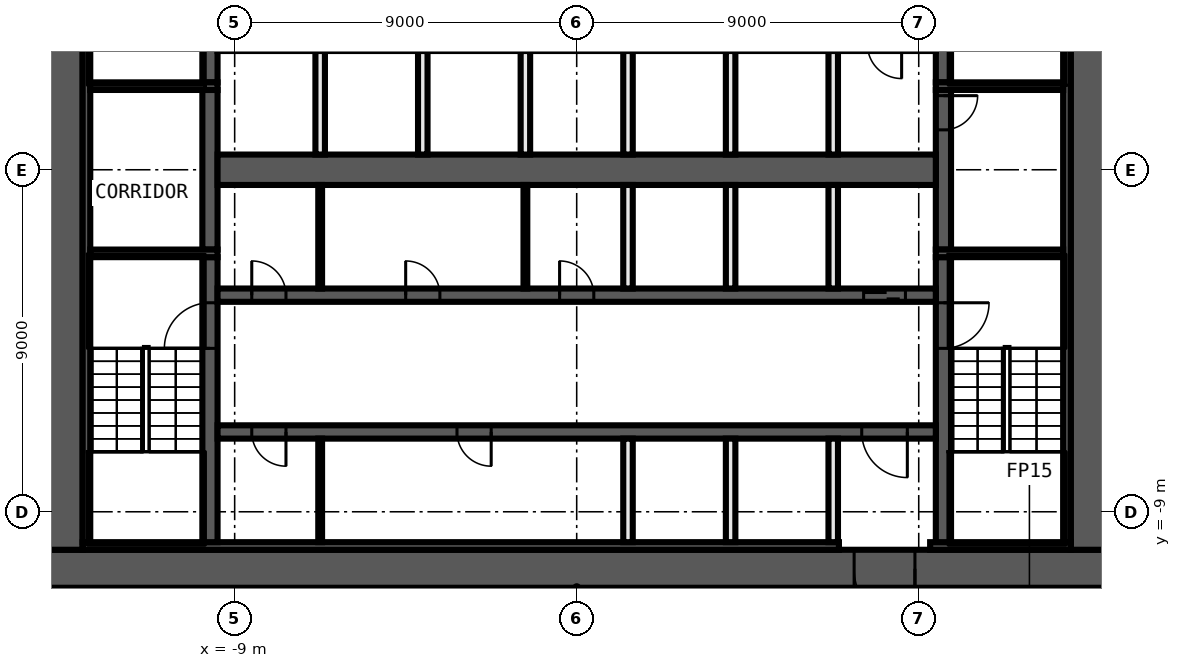
"""IFC4 building model, lengths in metres.
Left out: names, types, materials, properties, quantities, classifications, styles, units other than length and angle.
Written with IfcOpenShell. Run it as: python <this file> out.ifc"""

import sys

from ifc_helpers import new_model, si_unit, direction, frame, frame_2d, origin, place, context, subcontext, project, spatial, rectangle, extrude, element, fill, save


model = new_model("IFC4")
c1 = context("Model", 3, precision=1e-05, world=origin(), true_north=direction((0.0, 1.0)))
c2 = subcontext(c1, "Body", "Model", "MODEL_VIEW")
j1 = project(units=[si_unit("LENGTHUNIT", "METRE"), si_unit("PLANEANGLEUNIT", "RADIAN")], contexts=[c1])
p1 = place(None, origin())
s1 = spatial("IfcSite", under=j1, at=p1, CompositionType="ELEMENT")
p2 = place(p1, origin())
s2 = spatial("IfcBuilding", under=s1, at=p2, CompositionType="ELEMENT")
p3 = place(p2, frame((0.0, 0.0, 139.6)))
s3 = spatial("IfcBuildingStorey", under=s2, at=p3, CompositionType="ELEMENT", Elevation=139.6)
p4 = place(p3, frame((14.0, -10.5, 0.0), z_axis=(0.0, 0.0, 1.0), x_axis=(-1.0, 0.0, 0.0)))
e1 = element("IfcWall", 1, at=p4, inside=s3, PredefinedType="SHEAR", context=c2, shape_type="SweptSolid", body=[
    extrude(rectangle(XDim=28.0, YDim=1.0, at=frame_2d((14.0, 0.0))), origin(), (0.0, 0.0, 1.0), 5.4),
])
p5 = place(p4, frame((5.1, 0.0, 0.0)))
e2 = element("IfcOpeningElement", 2, at=p5, cuts=e1, PredefinedType="OPENING", context=c2, shape_type="SweptSolid", body=[
    extrude(rectangle(XDim=1.6, YDim=2.1, at=frame_2d((0.8, 1.05))), frame((0.0, 0.51, 0.0), z_axis=(0.0, -1.0, 0.0), x_axis=(1.0, 0.0, 0.0)), (0.0, 0.0, 1.0), 1.02),
])
for number, where, z_axis, x_axis in (
    (3, (13.5, 10.0, 0.0), (0.0, 0.0, 1.0), (0.0, -1.0, 0.0)),
    (4, (-13.5, -10.0, 0.0), (0.0, 0.0, 1.0), (0.0, 1.0, 0.0)),
):
    element("IfcWall", number, at=place(p3, frame(where, z_axis=z_axis, x_axis=x_axis)), inside=s3, PredefinedType="SHEAR", context=c2, shape_type="SweptSolid", body=[
        extrude(rectangle(XDim=20.0, YDim=1.0, at=frame_2d((10.0, 0.0))), origin(), (0.0, 0.0, 1.0), 5.4),
    ])
p6 = place(p3, frame((13.0, -9.9, 0.0), z_axis=(0.0, 0.0, 1.0), x_axis=(-1.0, 0.0, 0.0)))
e5 = element("IfcWall", 5, at=p6, inside=s3, PredefinedType="SHEAR", context=c2, shape_type="SweptSolid", body=[
    extrude(rectangle(XDim=3.7, YDim=0.2, at=frame_2d((1.85, 0.0))), origin(), (0.0, 0.0, 1.0), 5.4),
])
p7 = place(p3, frame((6.9, -9.9, 0.0), z_axis=(0.0, 0.0, 1.0), x_axis=(-1.0, 0.0, 0.0)))
e6 = element("IfcWall", 6, at=p7, inside=s3, PredefinedType="SHEAR", context=c2, shape_type="SweptSolid", body=[
    extrude(rectangle(XDim=19.9, YDim=0.2, at=frame_2d((9.95, 0.0))), origin(), (0.0, 0.0, 1.0), 5.4),
])
for number, where, z_axis, x_axis in (
    (7, (12.9, 9.8, 0.0), (0.0, 0.0, 1.0), (0.0, -1.0, 0.0)),
    (8, (-12.9, -9.8, 0.0), (0.0, 0.0, 1.0), (0.0, 1.0, 0.0)),
):
    element("IfcWall", number, at=place(p3, frame(where, z_axis=z_axis, x_axis=x_axis)), inside=s3, PredefinedType="SHEAR", context=c2, shape_type="SweptSolid", body=[
        extrude(rectangle(XDim=19.6, YDim=0.2, at=frame_2d((9.8, 0.0))), origin(), (0.0, 0.0, 1.0), 5.4),
    ])
p8 = place(p3, frame((9.65, -2.3, 0.0), z_axis=(0.0, 0.0, 1.0), x_axis=(0.0, -1.0, 0.0)))
e9 = element("IfcWall", 9, at=p8, inside=s3, PredefinedType="SHEAR", context=c2, shape_type="SweptSolid", body=[
    extrude(rectangle(XDim=7.5, YDim=0.4, at=frame_2d((3.75, 0.0))), origin(), (0.0, 0.0, 1.0), 5.4),
])
p9 = place(p8, frame((1.2, 0.0, 0.0)))
e10 = element("IfcOpeningElement", 10, at=p9, cuts=e9, PredefinedType="OPENING", context=c2, shape_type="SweptSolid", body=[
    extrude(rectangle(XDim=1.2, YDim=2.1, at=frame_2d((0.6, 1.05))), frame((0.0, 0.21, 0.0), z_axis=(0.0, -1.0, 0.0), x_axis=(1.0, 0.0, 0.0)), (0.0, 0.0, 1.0), 0.42),
])
p10 = place(p3, frame((9.65, 2.1, 0.0), z_axis=(0.0, 0.0, 1.0), x_axis=(0.0, -1.0, 0.0)))
e11 = element("IfcWall", 11, at=p10, inside=s3, PredefinedType="SHEAR", context=c2, shape_type="SweptSolid", body=[
    extrude(rectangle(XDim=4.2, YDim=0.4, at=frame_2d((2.1, 0.0))), origin(), (0.0, 0.0, 1.0), 5.4),
])
p11 = place(p10, frame((0.15, 0.0, 0.0)))
e12 = element("IfcOpeningElement", 12, at=p11, cuts=e11, PredefinedType="OPENING", context=c2, shape_type="SweptSolid", body=[
    extrude(rectangle(XDim=0.9, YDim=2.1, at=frame_2d((0.45, 1.05))), frame((0.0, 0.21, 0.0), z_axis=(0.0, -1.0, 0.0), x_axis=(1.0, 0.0, 0.0)), (0.0, 0.0, 1.0), 0.42),
])
p12 = place(p3, frame((9.65, 9.8, 0.0), z_axis=(0.0, 0.0, 1.0), x_axis=(0.0, -1.0, 0.0)))
e13 = element("IfcWall", 13, at=p12, inside=s3, PredefinedType="SHEAR", context=c2, shape_type="SweptSolid", body=[
    extrude(rectangle(XDim=7.5, YDim=0.4, at=frame_2d((3.75, 0.0))), origin(), (0.0, 0.0, 1.0), 5.4),
])
p13 = place(p12, frame((5.1, 0.0, 0.0)))
e14 = element("IfcOpeningElement", 14, at=p13, cuts=e13, PredefinedType="OPENING", context=c2, shape_type="SweptSolid", body=[
    extrude(rectangle(XDim=1.2, YDim=2.1, at=frame_2d((0.6, 1.05))), frame((0.0, 0.21, 0.0), z_axis=(0.0, -1.0, 0.0), x_axis=(1.0, 0.0, 0.0)), (0.0, 0.0, 1.0), 0.42),
])
p14 = place(p3, frame((-9.65, -9.8, 0.0), z_axis=(0.0, 0.0, 1.0), x_axis=(0.0, 1.0, 0.0)))
e15 = element("IfcWall", 15, at=p14, inside=s3, PredefinedType="SHEAR", context=c2, shape_type="SweptSolid", body=[
    extrude(rectangle(XDim=7.5, YDim=0.4, at=frame_2d((3.75, 0.0))), origin(), (0.0, 0.0, 1.0), 5.4),
])
p15 = place(p14, frame((5.1, 0.0, 0.0)))
e16 = element("IfcOpeningElement", 16, at=p15, cuts=e15, PredefinedType="OPENING", context=c2, shape_type="SweptSolid", body=[
    extrude(rectangle(XDim=1.2, YDim=2.1, at=frame_2d((0.6, 1.05))), frame((0.0, 0.21, 0.0), z_axis=(0.0, -1.0, 0.0), x_axis=(1.0, 0.0, 0.0)), (0.0, 0.0, 1.0), 0.42),
])
p16 = place(p3, frame((-9.65, -2.1, 0.0), z_axis=(0.0, 0.0, 1.0), x_axis=(0.0, 1.0, 0.0)))
e17 = element("IfcWall", 17, at=p16, inside=s3, PredefinedType="SHEAR", context=c2, shape_type="SweptSolid", body=[
    extrude(rectangle(XDim=4.2, YDim=0.4, at=frame_2d((2.1, 0.0))), origin(), (0.0, 0.0, 1.0), 5.4),
])
p17 = place(p3, frame((-9.65, 2.3, 0.0), z_axis=(0.0, 0.0, 1.0), x_axis=(0.0, 1.0, 0.0)))
e18 = element("IfcWall", 18, at=p17, inside=s3, PredefinedType="SHEAR", context=c2, shape_type="SweptSolid", body=[
    extrude(rectangle(XDim=7.5, YDim=0.4, at=frame_2d((3.75, 0.0))), origin(), (0.0, 0.0, 1.0), 5.4),
])
p18 = place(p17, frame((1.2, 0.0, 0.0)))
e19 = element("IfcOpeningElement", 19, at=p18, cuts=e18, PredefinedType="OPENING", context=c2, shape_type="SweptSolid", body=[
    extrude(rectangle(XDim=1.2, YDim=2.1, at=frame_2d((0.6, 1.05))), frame((0.0, 0.21, 0.0), z_axis=(0.0, -1.0, 0.0), x_axis=(1.0, 0.0, 0.0)), (0.0, 0.0, 1.0), 0.42),
])
for number, where, z_axis, x_axis in (
    (20, (9.45, 2.2, 0.0), (0.0, 0.0, 1.0), (1.0, 0.0, 0.0)),
    (21, (-9.45, 2.2, 0.0), (0.0, 0.0, 1.0), (-1.0, 0.0, 0.0)),
    (22, (9.45, -2.2, 0.0), (0.0, 0.0, 1.0), (1.0, 0.0, 0.0)),
    (23, (-9.45, -2.2, 0.0), (0.0, 0.0, 1.0), (-1.0, 0.0, 0.0)),
):
    element("IfcWall", number, at=place(p3, frame(where, z_axis=z_axis, x_axis=x_axis)), inside=s3, PredefinedType="SHEAR", context=c2, shape_type="SweptSolid", body=[
        extrude(rectangle(XDim=3.35, YDim=0.2, at=frame_2d((1.675, 0.0))), origin(), (0.0, 0.0, 1.0), 5.4),
    ])
p19 = place(p3, frame((-9.45, -3.3, 0.0), z_axis=(0.0, 0.0, 1.0), x_axis=(1.0, 0.0, 0.0)))
e24 = element("IfcWall", 24, at=p19, inside=s3, PredefinedType="SHEAR", context=c2, shape_type="SweptSolid", body=[
    extrude(rectangle(XDim=18.9, YDim=0.35, at=frame_2d((9.45, 0.0))), origin(), (0.0, 0.0, 1.0), 5.4),
])
p20 = place(p19, frame((17.0, 0.0, 0.0)))
e25 = element("IfcOpeningElement", 25, at=p20, cuts=e24, PredefinedType="OPENING", context=c2, shape_type="SweptSolid", body=[
    extrude(rectangle(XDim=1.1, YDim=2.1, at=frame_2d((0.55, 1.05))), frame((0.0, 0.185, 0.0), z_axis=(0.0, -1.0, 0.0), x_axis=(1.0, 0.0, 0.0)), (0.0, 0.0, 1.0), 0.37),
])
p21 = place(p19, frame((0.9, 0.0, 0.0)))
e26 = element("IfcOpeningElement", 26, at=p21, cuts=e24, PredefinedType="OPENING", context=c2, shape_type="SweptSolid", body=[
    extrude(rectangle(XDim=0.9, YDim=2.1, at=frame_2d((0.45, 1.05))), frame((0.0, 0.185, 0.0), z_axis=(0.0, -1.0, 0.0), x_axis=(1.0, 0.0, 0.0)), (0.0, 0.0, 1.0), 0.37),
])
p22 = place(p19, frame((4.95, 0.0, 0.0)))
e27 = element("IfcOpeningElement", 27, at=p22, cuts=e24, PredefinedType="OPENING", context=c2, shape_type="SweptSolid", body=[
    extrude(rectangle(XDim=0.9, YDim=2.1, at=frame_2d((0.45, 1.05))), frame((0.0, 0.185, 0.0), z_axis=(0.0, -1.0, 0.0), x_axis=(1.0, 0.0, 0.0)), (0.0, 0.0, 1.0), 0.37),
])
p23 = place(p19, frame((9.0, 0.0, 0.0)))
e28 = element("IfcOpeningElement", 28, at=p23, cuts=e24, PredefinedType="OPENING", context=c2, shape_type="SweptSolid", body=[
    extrude(rectangle(XDim=0.9, YDim=2.1, at=frame_2d((0.45, 1.05))), frame((0.0, 0.185, 0.0), z_axis=(0.0, -1.0, 0.0), x_axis=(1.0, 0.0, 0.0)), (0.0, 0.0, 1.0), 0.37),
])
p24 = place(p3, frame((9.45, -6.9, 0.0), z_axis=(0.0, 0.0, 1.0), x_axis=(-1.0, 0.0, 0.0)))
e29 = element("IfcWall", 29, at=p24, inside=s3, PredefinedType="SHEAR", context=c2, shape_type="SweptSolid", body=[
    extrude(rectangle(XDim=18.9, YDim=0.35, at=frame_2d((9.45, 0.0))), origin(), (0.0, 0.0, 1.0), 5.4),
])
p25 = place(p24, frame((0.75, 0.0, 0.0)))
e30 = element("IfcOpeningElement", 30, at=p25, cuts=e29, PredefinedType="OPENING", context=c2, shape_type="SweptSolid", body=[
    extrude(rectangle(XDim=1.2, YDim=2.1, at=frame_2d((0.6, 1.05))), frame((0.0, 0.185, 0.0), z_axis=(0.0, -1.0, 0.0), x_axis=(1.0, 0.0, 0.0)), (0.0, 0.0, 1.0), 0.37),
])
p26 = place(p24, frame((17.1, 0.0, 0.0)))
e31 = element("IfcOpeningElement", 31, at=p26, cuts=e29, PredefinedType="OPENING", context=c2, shape_type="SweptSolid", body=[
    extrude(rectangle(XDim=0.9, YDim=2.1, at=frame_2d((0.45, 1.05))), frame((0.0, 0.185, 0.0), z_axis=(0.0, -1.0, 0.0), x_axis=(1.0, 0.0, 0.0)), (0.0, 0.0, 1.0), 0.37),
])
p27 = place(p24, frame((11.7, 0.0, 0.0)))
e32 = element("IfcOpeningElement", 32, at=p27, cuts=e29, PredefinedType="OPENING", context=c2, shape_type="SweptSolid", body=[
    extrude(rectangle(XDim=0.9, YDim=2.1, at=frame_2d((0.45, 1.05))), frame((0.0, 0.185, 0.0), z_axis=(0.0, -1.0, 0.0), x_axis=(1.0, 0.0, 0.0)), (0.0, 0.0, 1.0), 0.37),
])
p28 = place(p3, frame((-9.45, 0.0, 0.0), z_axis=(0.0, 0.0, 1.0), x_axis=(1.0, 0.0, 0.0)))
e33 = element("IfcWall", 33, at=p28, inside=s3, PredefinedType="SHEAR", context=c2, shape_type="SweptSolid", body=[
    extrude(rectangle(XDim=18.9, YDim=0.8, at=frame_2d((9.45, 0.0))), origin(), (0.0, 0.0, 1.0), 5.4),
])
for number, where, z_axis, x_axis in (
    (34, (6.75, -9.8, 0.0), (0.0, 0.0, 1.0), (0.0, 1.0, 0.0)),
    (35, (6.75, -3.125, 0.0), (0.0, 0.0, 1.0), (0.0, 1.0, 0.0)),
    (36, (6.75, 0.4, 0.0), (0.0, 0.0, 1.0), (0.0, 1.0, 0.0)),
    (37, (4.05, -9.8, 0.0), (0.0, 0.0, 1.0), (0.0, 1.0, 0.0)),
    (38, (4.05, -3.125, 0.0), (0.0, 0.0, 1.0), (0.0, 1.0, 0.0)),
    (39, (4.05, 0.4, 0.0), (0.0, 0.0, 1.0), (0.0, 1.0, 0.0)),
    (40, (1.35, -9.8, 0.0), (0.0, 0.0, 1.0), (0.0, 1.0, 0.0)),
    (41, (1.35, -3.125, 0.0), (0.0, 0.0, 1.0), (0.0, 1.0, 0.0)),
    (42, (1.35, 0.4, 0.0), (0.0, 0.0, 1.0), (0.0, 1.0, 0.0)),
):
    element("IfcWall", number, at=place(p3, frame(where, z_axis=z_axis, x_axis=x_axis)), inside=s3, PredefinedType="SOLIDWALL", context=c2, shape_type="SweptSolid", body=[
        extrude(rectangle(XDim=2.725, YDim=0.25, at=frame_2d((1.363, 0.0))), origin(), (0.0, 0.0, 1.0), 5.4),
    ])
p29 = place(p3, frame((-1.35, -3.125, 0.0), z_axis=(0.0, 0.0, 1.0), x_axis=(0.0, 1.0, 0.0)))
e43 = element("IfcWall", 43, at=p29, inside=s3, PredefinedType="PARTITIONING", context=c2, shape_type="SweptSolid", body=[
    extrude(rectangle(XDim=2.725, YDim=0.1, at=frame_2d((1.363, 0.0))), origin(), (0.0, 0.0, 1.0), 5.4),
])
for number, where, z_axis, x_axis in (
    (44, (-1.35, 0.4, 0.0), (0.0, 0.0, 1.0), (0.0, 1.0, 0.0)),
    (45, (-4.05, 0.4, 0.0), (0.0, 0.0, 1.0), (0.0, 1.0, 0.0)),
):
    element("IfcWall", number, at=place(p3, frame(where, z_axis=z_axis, x_axis=x_axis)), inside=s3, PredefinedType="SOLIDWALL", context=c2, shape_type="SweptSolid", body=[
        extrude(rectangle(XDim=2.725, YDim=0.25, at=frame_2d((1.363, 0.0))), origin(), (0.0, 0.0, 1.0), 5.4),
    ])
for number, where, z_axis, x_axis in (
    (46, (-6.75, -9.8, 0.0), (0.0, 0.0, 1.0), (0.0, 1.0, 0.0)),
    (47, (-6.75, -3.125, 0.0), (0.0, 0.0, 1.0), (0.0, 1.0, 0.0)),
):
    element("IfcWall", number, at=place(p3, frame(where, z_axis=z_axis, x_axis=x_axis)), inside=s3, PredefinedType="PARTITIONING", context=c2, shape_type="SweptSolid", body=[
        extrude(rectangle(XDim=2.725, YDim=0.1, at=frame_2d((1.363, 0.0))), origin(), (0.0, 0.0, 1.0), 5.4),
    ])
p30 = place(p3, frame((-6.75, 0.4, 0.0), z_axis=(0.0, 0.0, 1.0), x_axis=(0.0, 1.0, 0.0)))
e48 = element("IfcWall", 48, at=p30, inside=s3, PredefinedType="SOLIDWALL", context=c2, shape_type="SweptSolid", body=[
    extrude(rectangle(XDim=2.725, YDim=0.25, at=frame_2d((1.363, 0.0))), origin(), (0.0, 0.0, 1.0), 5.4),
])
p31 = place(p11, origin())
e49 = element("IfcDoor", 49, at=p31, inside=s3, OperationType="SINGLE_SWING_RIGHT", PredefinedType="DOOR", context=c2, shape_type="SweptSolid", body=[
    extrude(rectangle(XDim=0.9, YDim=2.1, at=frame_2d((0.45, 1.05))), frame((0.0, 0.025, 0.0), z_axis=(0.0, -1.0, 0.0), x_axis=(1.0, 0.0, 0.0)), (0.0, 0.0, 1.0), 0.05),
])
fill(e12, e49)
p32 = place(p20, origin())
e50 = element("IfcDoor", 50, at=p32, inside=s3, OperationType="DOUBLE_DOOR_SLIDING", PredefinedType="DOOR", context=c2, shape_type="SweptSolid", body=[
    extrude(rectangle(XDim=1.1, YDim=2.1, at=frame_2d((0.55, 1.05))), frame((0.0, 0.025, 0.0), z_axis=(0.0, -1.0, 0.0), x_axis=(1.0, 0.0, 0.0)), (0.0, 0.0, 1.0), 0.05),
])
fill(e25, e50)
p33 = place(p5, origin())
e51 = element("IfcDoor", 51, at=p33, inside=s3, OperationType="DOUBLE_DOOR_SINGLE_SWING", PredefinedType="DOOR", context=c2, shape_type="SweptSolid", body=[
    extrude(rectangle(XDim=1.6, YDim=2.1, at=frame_2d((0.8, 1.05))), frame((0.0, 0.025, 0.0), z_axis=(0.0, -1.0, 0.0), x_axis=(1.0, 0.0, 0.0)), (0.0, 0.0, 1.0), 0.05),
])
fill(e2, e51)
p34 = place(p25, origin())
e52 = element("IfcDoor", 52, at=p34, inside=s3, OperationType="SINGLE_SWING_LEFT", PredefinedType="DOOR", context=c2, shape_type="SweptSolid", body=[
    extrude(rectangle(XDim=1.2, YDim=2.1, at=frame_2d((0.6, 1.05))), frame((0.0, 0.025, 0.0), z_axis=(0.0, -1.0, 0.0), x_axis=(1.0, 0.0, 0.0)), (0.0, 0.0, 1.0), 0.05),
])
fill(e30, e52)
p35 = place(p21, origin())
e53 = element("IfcDoor", 53, at=p35, inside=s3, OperationType="SINGLE_SWING_RIGHT", PredefinedType="DOOR", context=c2, shape_type="SweptSolid", body=[
    extrude(rectangle(XDim=0.9, YDim=2.1, at=frame_2d((0.45, 1.05))), frame((0.0, 0.025, 0.0), z_axis=(0.0, -1.0, 0.0), x_axis=(1.0, 0.0, 0.0)), (0.0, 0.0, 1.0), 0.05),
])
fill(e26, e53)
p36 = place(p22, origin())
e54 = element("IfcDoor", 54, at=p36, inside=s3, OperationType="SINGLE_SWING_LEFT", PredefinedType="DOOR", context=c2, shape_type="SweptSolid", body=[
    extrude(rectangle(XDim=0.9, YDim=2.1, at=frame_2d((0.45, 1.05))), frame((0.0, 0.025, 0.0), z_axis=(0.0, -1.0, 0.0), x_axis=(1.0, 0.0, 0.0)), (0.0, 0.0, 1.0), 0.05),
])
fill(e27, e54)
p37 = place(p23, origin())
e55 = element("IfcDoor", 55, at=p37, inside=s3, OperationType="SINGLE_SWING_RIGHT", PredefinedType="DOOR", context=c2, shape_type="SweptSolid", body=[
    extrude(rectangle(XDim=0.9, YDim=2.1, at=frame_2d((0.45, 1.05))), frame((0.0, 0.025, 0.0), z_axis=(0.0, -1.0, 0.0), x_axis=(1.0, 0.0, 0.0)), (0.0, 0.0, 1.0), 0.05),
])
fill(e28, e55)
p38 = place(p26, origin())
e56 = element("IfcDoor", 56, at=p38, inside=s3, OperationType="SINGLE_SWING_LEFT", PredefinedType="DOOR", context=c2, shape_type="SweptSolid", body=[
    extrude(rectangle(XDim=0.9, YDim=2.1, at=frame_2d((0.45, 1.05))), frame((0.0, 0.025, 0.0), z_axis=(0.0, -1.0, 0.0), x_axis=(1.0, 0.0, 0.0)), (0.0, 0.0, 1.0), 0.05),
])
fill(e31, e56)
p39 = place(p27, origin())
e57 = element("IfcDoor", 57, at=p39, inside=s3, OperationType="SINGLE_SWING_RIGHT", PredefinedType="DOOR", context=c2, shape_type="SweptSolid", body=[
    extrude(rectangle(XDim=0.9, YDim=2.1, at=frame_2d((0.45, 1.05))), frame((0.0, 0.025, 0.0), z_axis=(0.0, -1.0, 0.0), x_axis=(1.0, 0.0, 0.0)), (0.0, 0.0, 1.0), 0.05),
])
fill(e32, e57)
p40 = place(p9, origin())
e58 = element("IfcDoor", 58, at=p40, inside=s3, OperationType="SINGLE_SWING_RIGHT", PredefinedType="DOOR", context=c2, shape_type="SweptSolid", body=[
    extrude(rectangle(XDim=1.2, YDim=2.1, at=frame_2d((0.6, 1.05))), frame((0.0, 0.025, 0.0), z_axis=(0.0, -1.0, 0.0), x_axis=(1.0, 0.0, 0.0)), (0.0, 0.0, 1.0), 0.05),
])
fill(e10, e58)
p41 = place(p15, origin())
e59 = element("IfcDoor", 59, at=p41, inside=s3, OperationType="SINGLE_SWING_LEFT", PredefinedType="DOOR", context=c2, shape_type="SweptSolid", body=[
    extrude(rectangle(XDim=1.2, YDim=2.1, at=frame_2d((0.6, 1.05))), frame((0.0, 0.025, 0.0), z_axis=(0.0, -1.0, 0.0), x_axis=(1.0, 0.0, 0.0)), (0.0, 0.0, 1.0), 0.05),
])
fill(e16, e59)
save(model, sys.argv[1])
